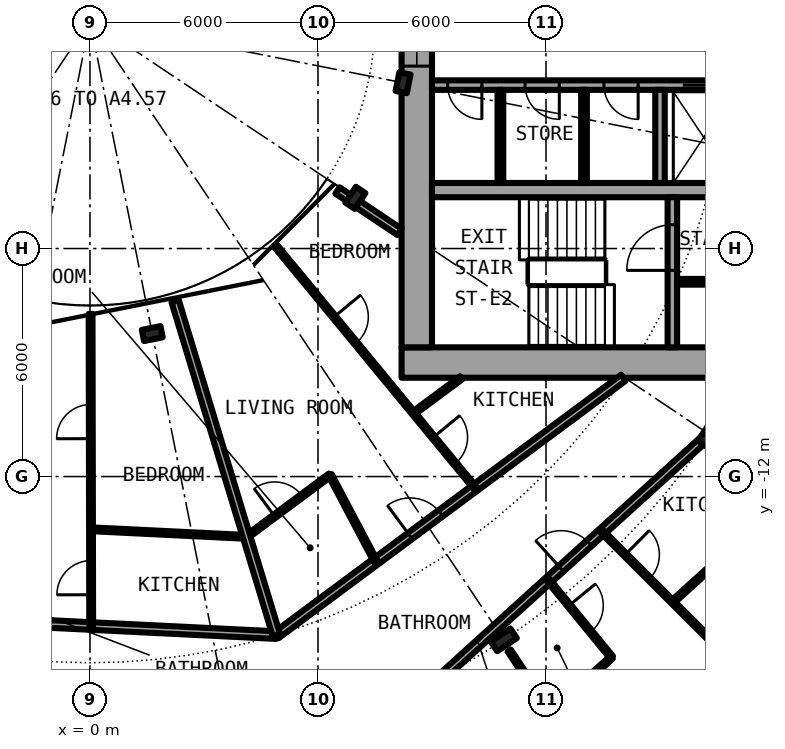
"""IFC4 building model, lengths in metres.
Left out: names, types, materials, properties, quantities, classifications, styles, units other than length and angle.
Written with IfcOpenShell. Run it as: python <this file> out.ifc"""

import sys

from ifc_helpers import new_model, si_unit, direction, frame, frame_2d, origin, origin_2d, place, context, subcontext, project, spatial, rectangle, i_section, extrude, element, fill, save


model = new_model("IFC4")
c1 = context("Model", 3, precision=1e-05, world=origin(), true_north=direction((0.0, 1.0)))
c2 = subcontext(c1, "Body", "Model", "MODEL_VIEW")
j1 = project(units=[si_unit("LENGTHUNIT", "METRE"), si_unit("PLANEANGLEUNIT", "RADIAN")], contexts=[c1])
p1 = place(None, origin())
s1 = spatial("IfcSite", under=j1, at=p1, CompositionType="ELEMENT")
p2 = place(p1, origin())
s2 = spatial("IfcBuilding", under=s1, at=p2, CompositionType="ELEMENT")
p3 = place(p2, frame((0.0, 0.0, 41.1)))
s3 = spatial("IfcBuildingStorey", under=s2, at=p3, CompositionType="ELEMENT", Elevation=41.1)
for number, where, z_axis, x_axis in (
    (1, (10.889, -16.297, 0.0), (0.0, 0.0, 1.0), (0.556, -0.831, 0.0)),
    (2, (16.297, -10.889, 0.0), (0.0, 0.0, 1.0), (0.831, -0.556, 0.0)),
):
    element("IfcColumn", number, at=place(p3, frame(where, z_axis=z_axis, x_axis=x_axis)), inside=s3, PredefinedType="COLUMN", context=c2, shape_type="SweptSolid", body=[
        extrude(i_section(OverallWidth=0.305, OverallDepth=0.62, WebThickness=0.021, FlangeThickness=0.04, FilletRadius=0.027, at=origin_2d()), origin(), (0.0, 0.0, 1.0), 3.05),
    ])
for number, where, z_axis, x_axis in (
    (3, (1.639, -8.239, 0.0), (0.0, 0.0, 1.0), (0.195, -0.981, 0.0)),
    (4, (6.984, -4.667, 0.0), (0.0, 0.0, 1.0), (0.831, -0.556, 0.0)),
    (5, (8.239, -1.639, 0.0), (0.0, 0.0, 1.0), (0.981, -0.195, 0.0)),
):
    element("IfcColumn", number, at=place(p3, frame(where, z_axis=z_axis, x_axis=x_axis)), inside=s3, PredefinedType="COLUMN", context=c2, shape_type="SweptSolid", body=[
        extrude(i_section(OverallWidth=0.3, OverallDepth=0.5, WebThickness=0.014, FlangeThickness=0.028, FilletRadius=0.027, at=origin_2d()), origin(), (0.0, 0.0, 1.0), 3.05),
    ])
p4 = place(p3, frame((8.2, -9.0, 0.0), z_axis=(0.0, 0.0, 1.0), x_axis=(1.0, 0.0, 0.0)))
e6 = element("IfcWall", 6, at=p4, inside=s3, PredefinedType="SHEAR", context=c2, shape_type="SweptSolid", body=[
    extrude(rectangle(XDim=14.2, YDim=0.8, at=frame_2d((7.1, 0.0))), origin(), (0.0, 0.0, 1.0), 3.05),
])
p5 = place(p4, frame((11.675, 0.0, 0.0)))
e7 = element("IfcOpeningElement", 7, at=p5, cuts=e6, PredefinedType="OPENING", context=c2, shape_type="SweptSolid", body=[
    extrude(rectangle(XDim=1.2, YDim=2.3, at=frame_2d((0.6, 1.15))), frame((0.0, 0.41, 0.0), z_axis=(0.0, -1.0, 0.0), x_axis=(1.0, 0.0, 0.0)), (0.0, 0.0, 1.0), 0.82),
])
p6 = place(p3, frame((8.6, -8.6, 0.0), z_axis=(0.0, 0.0, 1.0), x_axis=(0.0, 1.0, 0.0)))
e8 = element("IfcWall", 8, at=p6, inside=s3, PredefinedType="SHEAR", context=c2, shape_type="SweptSolid", body=[
    extrude(rectangle(XDim=17.2, YDim=0.8, at=frame_2d((8.6, 0.0))), origin(), (0.0, 0.0, 1.0), 3.05),
])
p7 = place(p6, frame((7.4, 0.0, 0.1)))
e9 = element("IfcOpeningElement", 9, at=p7, cuts=e8, PredefinedType="OPENING", context=c2, shape_type="SweptSolid", body=[
    extrude(rectangle(XDim=2.4, YDim=2.2, at=frame_2d((1.2, 1.1))), frame((0.0, 0.41, 0.0), z_axis=(0.0, -1.0, 0.0), x_axis=(1.0, 0.0, 0.0)), (0.0, 0.0, 1.0), 0.82),
])
p8 = place(p3, frame((19.15, -1.7, 0.0), z_axis=(0.0, 0.0, 1.0), x_axis=(-1.0, 0.0, 0.0)))
e10 = element("IfcWall", 10, at=p8, inside=s3, PredefinedType="SHEAR", context=c2, shape_type="SweptSolid", body=[
    extrude(rectangle(XDim=10.15, YDim=0.25, at=frame_2d((5.075, 0.0))), origin(), (0.0, 0.0, 1.0), 3.05),
])
p9 = place(p8, frame((2.45, 0.0, 0.0)))
e11 = element("IfcOpeningElement", 11, at=p9, cuts=e10, PredefinedType="OPENING", context=c2, shape_type="SweptSolid", body=[
    extrude(rectangle(XDim=1.1, YDim=2.3, at=frame_2d((0.55, 1.15))), frame((0.0, 0.135, 0.0), z_axis=(0.0, -1.0, 0.0), x_axis=(1.0, 0.0, 0.0)), (0.0, 0.0, 1.0), 0.27),
])
p10 = place(p8, frame((8.837, 0.0, 0.0)))
e12 = element("IfcOpeningElement", 12, at=p10, cuts=e10, PredefinedType="OPENING", context=c2, shape_type="SweptSolid", body=[
    extrude(rectangle(XDim=0.9, YDim=2.3, at=frame_2d((0.45, 1.15))), frame((0.0, 0.135, 0.0), z_axis=(0.0, -1.0, 0.0), x_axis=(1.0, 0.0, 0.0)), (0.0, 0.0, 1.0), 0.27),
])
p11 = place(p8, frame((6.8, 0.0, 0.0)))
e13 = element("IfcOpeningElement", 13, at=p11, cuts=e10, PredefinedType="OPENING", context=c2, shape_type="SweptSolid", body=[
    extrude(rectangle(XDim=0.9, YDim=2.3, at=frame_2d((0.45, 1.15))), frame((0.0, 0.135, 0.0), z_axis=(0.0, -1.0, 0.0), x_axis=(1.0, 0.0, 0.0)), (0.0, 0.0, 1.0), 0.27),
])
p12 = place(p8, frame((4.725, 0.0, 0.0)))
e14 = element("IfcOpeningElement", 14, at=p12, cuts=e10, PredefinedType="OPENING", context=c2, shape_type="SweptSolid", body=[
    extrude(rectangle(XDim=0.9, YDim=2.3, at=frame_2d((0.45, 1.15))), frame((0.0, 0.135, 0.0), z_axis=(0.0, -1.0, 0.0), x_axis=(1.0, 0.0, 0.0)), (0.0, 0.0, 1.0), 0.27),
])
p13 = place(p8, frame((0.413, 0.0, 0.0)))
e15 = element("IfcOpeningElement", 15, at=p13, cuts=e10, PredefinedType="OPENING", context=c2, shape_type="SweptSolid", body=[
    extrude(rectangle(XDim=0.9, YDim=2.3, at=frame_2d((0.45, 1.15))), frame((0.0, 0.135, 0.0), z_axis=(0.0, -1.0, 0.0), x_axis=(1.0, 0.0, 0.0)), (0.0, 0.0, 1.0), 0.27),
])
p14 = place(p3, frame((9.0, -4.462, 0.0), z_axis=(0.0, 0.0, 1.0), x_axis=(1.0, 0.0, 0.0)))
e16 = element("IfcWall", 16, at=p14, inside=s3, PredefinedType="SHEAR", context=c2, shape_type="SweptSolid", body=[
    extrude(rectangle(XDim=10.15, YDim=0.375, at=frame_2d((5.075, 0.0))), origin(), (0.0, 0.0, 1.0), 3.05),
])
p15 = place(p3, frame((15.325, -8.6, 0.0), z_axis=(0.0, 0.0, 1.0), x_axis=(0.0, 1.0, 0.0)))
e17 = element("IfcWall", 17, at=p15, inside=s3, PredefinedType="SHEAR", context=c2, shape_type="SweptSolid", body=[
    extrude(rectangle(XDim=3.95, YDim=0.25, at=frame_2d((1.975, 0.0))), origin(), (0.0, 0.0, 1.0), 3.05),
])
p16 = place(p15, frame((2.025, 0.0, 0.0)))
e18 = element("IfcOpeningElement", 18, at=p16, cuts=e17, PredefinedType="OPENING", context=c2, shape_type="SweptSolid", body=[
    extrude(rectangle(XDim=1.2, YDim=2.3, at=frame_2d((0.6, 1.15))), frame((0.0, 0.135, 0.0), z_axis=(0.0, -1.0, 0.0), x_axis=(1.0, 0.0, 0.0)), (0.0, 0.0, 1.0), 0.27),
])
p17 = place(p3, frame((15.0, -1.825, 0.0), z_axis=(0.0, 0.0, 1.0), x_axis=(0.0, -1.0, 0.0)))
e19 = element("IfcWall", 19, at=p17, inside=s3, PredefinedType="SOLIDWALL", context=c2, shape_type="SweptSolid", body=[
    extrude(rectangle(XDim=2.45, YDim=0.25, at=frame_2d((1.225, 0.0))), origin(), (0.0, 0.0, 1.0), 2.7),
])
for number, where, z_axis, x_axis in (
    (20, (10.8, -1.825, 0.0), (0.0, 0.0, 1.0), (0.0, -1.0, 0.0)),
    (21, (13.0, -1.825, 0.0), (0.0, 0.0, 1.0), (0.0, -1.0, 0.0)),
):
    element("IfcWall", number, at=place(p3, frame(where, z_axis=z_axis, x_axis=x_axis)), inside=s3, PredefinedType="PARTITIONING", context=c2, shape_type="SweptSolid", body=[
        extrude(rectangle(XDim=2.45, YDim=0.15, at=frame_2d((1.225, 0.0))), origin(), (0.0, 0.0, 1.0), 2.7),
    ])
p18 = place(p3, frame((15.45, -6.875, 0.0), z_axis=(0.0, 0.0, 1.0), x_axis=(1.0, 0.0, 0.0)))
e22 = element("IfcWall", 22, at=p18, inside=s3, PredefinedType="PARTITIONING", context=c2, shape_type="SweptSolid", body=[
    extrude(rectangle(XDim=3.7, YDim=0.15, at=frame_2d((1.85, 0.0))), origin(), (0.0, 0.0, 1.0), 2.7),
])
p19 = place(p18, frame((1.4, 0.0, 0.0)))
e23 = element("IfcOpeningElement", 23, at=p19, cuts=e22, PredefinedType="OPENING", context=c2, shape_type="SweptSolid", body=[
    extrude(rectangle(XDim=0.9, YDim=2.3, at=frame_2d((0.45, 1.15))), frame((0.0, 0.085, 0.0), z_axis=(0.0, -1.0, 0.0), x_axis=(1.0, 0.0, 0.0)), (0.0, 0.0, 1.0), 0.17),
])
p20 = place(p3, frame((10.506, -19.671, 0.0), z_axis=(0.0, 0.0, 1.0), x_axis=(0.741162670015, 0.671325477377, 0.0)))
e24 = element("IfcWall", 24, at=p20, inside=s3, PredefinedType="PARTITIONING", context=c2, shape_type="SweptSolid", body=[
    extrude(rectangle(XDim=4.342, YDim=0.1, at=frame_2d((2.171, 0.0))), origin(), (0.0, 0.0, 1.0), 2.7),
])
p21 = place(p20, frame((0.643, 0.0, 0.0)))
e25 = element("IfcOpeningElement", 25, at=p21, cuts=e24, PredefinedType="OPENING", context=c2, shape_type="SweptSolid", body=[
    extrude(rectangle(XDim=0.9, YDim=2.3, at=frame_2d((0.45, 1.15))), frame((0.0, 0.06, 0.0), z_axis=(0.0, -1.0, 0.0), x_axis=(1.0, 0.0, 0.0)), (0.0, 0.0, 1.0), 0.12),
])
p22 = place(p3, frame((15.33, -15.301, 0.0), z_axis=(0.0, 0.0, 1.0), x_axis=(0.741109646243, 0.671384012504, 0.0)))
e26 = element("IfcWall", 26, at=p22, inside=s3, PredefinedType="PARTITIONING", context=c2, shape_type="SweptSolid", body=[
    extrude(rectangle(XDim=4.331, YDim=0.1, at=frame_2d((2.166, 0.0))), origin(), (0.0, 0.0, 1.0), 2.7),
])
p23 = place(p3, frame((9.239, -17.287, 0.0), z_axis=(0.0, 0.0, 1.0), x_axis=(0.74089212117, 0.671624050186, 0.0)))
e27 = element("IfcWall", 27, at=p23, inside=s3, PredefinedType="PARTITIONING", context=c2, shape_type="SweptSolid", body=[
    extrude(rectangle(XDim=9.368, YDim=0.2, at=frame_2d((4.684, 0.0))), origin(), (0.0, 0.0, 1.0), 2.38),
])
p24 = place(p23, frame((4.263, 0.0, 0.0)))
e28 = element("IfcOpeningElement", 28, at=p24, cuts=e27, PredefinedType="OPENING", context=c2, shape_type="SweptSolid", body=[
    extrude(rectangle(XDim=1.0, YDim=2.3, at=frame_2d((0.5, 1.15))), frame((0.0, 0.11, 0.0), z_axis=(0.0, -1.0, 0.0), x_axis=(1.0, 0.0, 0.0)), (0.0, 0.0, 1.0), 0.22),
])
p25 = place(p3, frame((-6.469, -15.614, 0.0), z_axis=(0.0, 0.0, 1.0), x_axis=(0.998798520108, -0.049005267363, 0.0)))
e29 = element("IfcWall", 29, at=p25, inside=s3, PredefinedType="PARTITIONING", context=c2, shape_type="SweptSolid", body=[
    extrude(rectangle(XDim=11.389, YDim=0.2, at=frame_2d((5.694, 0.0))), origin(), (0.0, 0.0, 1.0), 2.7),
])
p26 = place(p25, frame((4.383, 0.0, 0.0)))
e30 = element("IfcOpeningElement", 30, at=p26, cuts=e29, PredefinedType="OPENING", context=c2, shape_type="SweptSolid", body=[
    extrude(rectangle(XDim=1.0, YDim=2.3, at=frame_2d((0.5, 1.15))), frame((0.0, 0.11, 0.0), z_axis=(0.0, -1.0, 0.0), x_axis=(1.0, 0.0, 0.0)), (0.0, 0.0, 1.0), 0.22),
])
p27 = place(p3, frame((4.906, -16.172, 0.0), z_axis=(0.0, 0.0, 1.0), x_axis=(0.803202106898, 0.595706618626, 0.0)))
e31 = element("IfcWall", 31, at=p27, inside=s3, PredefinedType="PARTITIONING", context=c2, shape_type="SweptSolid", body=[
    extrude(rectangle(XDim=11.368, YDim=0.2, at=frame_2d((5.684, 0.0))), origin(), (0.0, 0.0, 1.0), 2.7),
])
p28 = place(p27, frame((4.38, 0.0, 0.0)))
e32 = element("IfcOpeningElement", 32, at=p28, cuts=e31, PredefinedType="OPENING", context=c2, shape_type="SweptSolid", body=[
    extrude(rectangle(XDim=1.0, YDim=2.3, at=frame_2d((0.5, 1.15))), frame((0.0, 0.11, 0.0), z_axis=(0.0, -1.0, 0.0), x_axis=(1.0, 0.0, 0.0)), (0.0, 0.0, 1.0), 0.22),
])
p29 = place(p3, frame((0.03, -13.387, 0.0), z_axis=(0.0, 0.0, 1.0), x_axis=(0.998798386358, -0.049007993321, 0.0)))
e33 = element("IfcWall", 33, at=p29, inside=s3, PredefinedType="PARTITIONING", context=c2, shape_type="SweptSolid", body=[
    extrude(rectangle(XDim=4.1, YDim=0.1, at=frame_2d((2.05, 0.0))), origin(), (0.0, 0.0, 1.0), 2.7),
])
p30 = place(p3, frame((4.119, -13.59, 0.0), z_axis=(0.0, 0.0, 1.0), x_axis=(0.803128348509, 0.595806055542, 0.0)))
e34 = element("IfcWall", 34, at=p30, inside=s3, PredefinedType="PARTITIONING", context=c2, shape_type="SweptSolid", body=[
    extrude(rectangle(XDim=2.734, YDim=0.1, at=frame_2d((1.367, 0.0))), origin(), (0.0, 0.0, 1.0), 2.7),
])
p31 = place(p30, frame((0.92, 0.0, 0.0)))
e35 = element("IfcOpeningElement", 35, at=p31, cuts=e34, PredefinedType="OPENING", context=c2, shape_type="SweptSolid", body=[
    extrude(rectangle(XDim=0.9, YDim=2.3, at=frame_2d((0.45, 1.15))), frame((0.0, 0.06, 0.0), z_axis=(0.0, -1.0, 0.0), x_axis=(1.0, 0.0, 0.0)), (0.0, 0.0, 1.0), 0.12),
])
p32 = place(p3, frame((8.513, -10.332, 0.0), z_axis=(0.0, 0.0, 1.0), x_axis=(0.803264156882, 0.595622946392, 0.0)))
e36 = element("IfcWall", 36, at=p32, inside=s3, PredefinedType="PARTITIONING", context=c2, shape_type="SweptSolid", body=[
    extrude(rectangle(XDim=1.565, YDim=0.1, at=frame_2d((0.782, 0.0))), origin(), (0.0, 0.0, 1.0), 2.7),
])
p33 = place(p3, frame((6.513, -4.472, 0.0), z_axis=(0.0, 0.0, 1.0), x_axis=(0.831417956244, -0.555647533996, 0.0)))
e37 = element("IfcWall", 37, at=p33, inside=s3, PredefinedType="PARTITIONING", context=c2, shape_type="SweptSolid", body=[
    extrude(rectangle(XDim=1.962, YDim=0.2, at=frame_2d((0.981, 0.0))), origin(), (0.0, 0.0, 1.0), 2.7),
])
p34 = place(p3, frame((0.032, -15.933, 0.0), z_axis=(0.0, 0.0, 1.0), x_axis=(-0.0019321625, 0.999998133372, 0.0)))
e38 = element("IfcWall", 38, at=p34, inside=s3, PredefinedType="PARTITIONING", context=c2, shape_type="SweptSolid", body=[
    extrude(rectangle(XDim=8.213, YDim=0.1, at=frame_2d((4.106, 0.0))), origin(), (0.0, 0.0, 1.0), 2.7),
])
p35 = place(p34, frame((0.823, 0.0, 0.0)))
e39 = element("IfcOpeningElement", 39, at=p35, cuts=e38, PredefinedType="OPENING", context=c2, shape_type="SweptSolid", body=[
    extrude(rectangle(XDim=0.9, YDim=2.3, at=frame_2d((0.45, 1.15))), frame((0.0, 0.06, 0.0), z_axis=(0.0, -1.0, 0.0), x_axis=(1.0, 0.0, 0.0)), (0.0, 0.0, 1.0), 0.12),
])
p36 = place(p34, frame((4.93, 0.0, 0.0)))
e40 = element("IfcOpeningElement", 40, at=p36, cuts=e38, PredefinedType="OPENING", context=c2, shape_type="SweptSolid", body=[
    extrude(rectangle(XDim=0.9, YDim=2.3, at=frame_2d((0.45, 1.15))), frame((0.0, 0.06, 0.0), z_axis=(0.0, -1.0, 0.0), x_axis=(1.0, 0.0, 0.0)), (0.0, 0.0, 1.0), 0.12),
])
p37 = place(p3, frame((2.242, -7.388, 0.0), z_axis=(0.0, 0.0, 1.0), x_axis=(0.290225889812, -0.956958166736, 0.0)))
e41 = element("IfcWall", 41, at=p37, inside=s3, PredefinedType="PARTITIONING", context=c2, shape_type="SweptSolid", body=[
    extrude(rectangle(XDim=9.179, YDim=0.2, at=frame_2d((4.59, 0.0))), origin(), (0.0, 0.0, 1.0), 2.7),
])
p38 = place(p3, frame((4.908, -5.959, 0.0), z_axis=(0.0, 0.0, 1.0), x_axis=(0.636105207978, -0.771602335652, 0.0)))
e42 = element("IfcWall", 42, at=p38, inside=s3, PredefinedType="PARTITIONING", context=c2, shape_type="SweptSolid", body=[
    extrude(rectangle(XDim=8.213, YDim=0.1, at=frame_2d((4.106, 0.0))), origin(), (0.0, 0.0, 1.0), 2.7),
])
p39 = place(p38, frame((6.49, 0.0, 0.0)))
e43 = element("IfcOpeningElement", 43, at=p39, cuts=e42, PredefinedType="OPENING", context=c2, shape_type="SweptSolid", body=[
    extrude(rectangle(XDim=0.9, YDim=2.3, at=frame_2d((0.45, 1.15))), frame((0.0, 0.06, 0.0), z_axis=(0.0, -1.0, 0.0), x_axis=(1.0, 0.0, 0.0)), (0.0, 0.0, 1.0), 0.12),
])
p40 = place(p38, frame((2.384, 0.0, 0.0)))
e44 = element("IfcOpeningElement", 44, at=p40, cuts=e42, PredefinedType="OPENING", context=c2, shape_type="SweptSolid", body=[
    extrude(rectangle(XDim=0.9, YDim=2.3, at=frame_2d((0.45, 1.15))), frame((0.0, 0.06, 0.0), z_axis=(0.0, -1.0, 0.0), x_axis=(1.0, 0.0, 0.0)), (0.0, 0.0, 1.0), 0.12),
])
p41 = place(p3, frame((6.318, -11.96, 0.0), z_axis=(0.0, 0.0, 1.0), x_axis=(0.467001992543, -0.884256263173, 0.0)))
e45 = element("IfcWall", 45, at=p41, inside=s3, PredefinedType="PARTITIONING", context=c2, shape_type="SweptSolid", body=[
    extrude(rectangle(XDim=2.572, YDim=0.1, at=frame_2d((1.286, 0.0))), origin(), (0.0, 0.0, 1.0), 2.7),
])
p42 = place(p3, frame((11.03, -16.576, 0.0), z_axis=(0.0, 0.0, 1.0), x_axis=(0.553954074672, -0.83254722578, 0.0)))
e46 = element("IfcWall", 46, at=p42, inside=s3, PredefinedType="PARTITIONING", context=c2, shape_type="SweptSolid", body=[
    extrude(rectangle(XDim=1.964, YDim=0.1, at=frame_2d((0.982, 0.0))), origin(), (0.0, 0.0, 1.0), 2.7),
])
p43 = place(p3, frame((12.062, -14.727, 0.0), z_axis=(0.0, 0.0, 1.0), x_axis=(0.633688798249, -0.773588073185, 0.0)))
e47 = element("IfcWall", 47, at=p43, inside=s3, PredefinedType="PARTITIONING", context=c2, shape_type="SweptSolid", body=[
    extrude(rectangle(XDim=2.623, YDim=0.1, at=frame_2d((1.312, 0.0))), origin(), (0.0, 0.0, 1.0), 2.7),
])
p44 = place(p43, frame((0.861, 0.0, 0.0)))
e48 = element("IfcOpeningElement", 48, at=p44, cuts=e47, PredefinedType="OPENING", context=c2, shape_type="SweptSolid", body=[
    extrude(rectangle(XDim=0.9, YDim=2.3, at=frame_2d((0.45, 1.15))), frame((0.0, 0.06, 0.0), z_axis=(0.0, -1.0, 0.0), x_axis=(1.0, 0.0, 0.0)), (0.0, 0.0, 1.0), 0.12),
])
p45 = place(p3, frame((13.474, -13.448, 0.0), z_axis=(0.0, 0.0, 1.0), x_axis=(0.707901324545, -0.706311344031, 0.0)))
e49 = element("IfcWall", 49, at=p45, inside=s3, PredefinedType="PARTITIONING", context=c2, shape_type="SweptSolid", body=[
    extrude(rectangle(XDim=8.138, YDim=0.1, at=frame_2d((4.069, 0.0))), origin(), (0.0, 0.0, 1.0), 2.7),
])
p46 = place(p45, frame((0.861, 0.0, 0.0)))
e50 = element("IfcOpeningElement", 50, at=p46, cuts=e49, PredefinedType="OPENING", context=c2, shape_type="SweptSolid", body=[
    extrude(rectangle(XDim=0.9, YDim=2.3, at=frame_2d((0.45, 1.15))), frame((0.0, 0.06, 0.0), z_axis=(0.0, -1.0, 0.0), x_axis=(1.0, 0.0, 0.0)), (0.0, 0.0, 1.0), 0.12),
])
p47 = place(p45, frame((4.931, 0.0, 0.0)))
e51 = element("IfcOpeningElement", 51, at=p47, cuts=e49, PredefinedType="OPENING", context=c2, shape_type="SweptSolid", body=[
    extrude(rectangle(XDim=0.9, YDim=2.3, at=frame_2d((0.45, 1.15))), frame((0.0, 0.06, 0.0), z_axis=(0.0, -1.0, 0.0), x_axis=(1.0, 0.0, 0.0)), (0.0, 0.0, 1.0), 0.12),
])
p48 = place(p9, origin())
e52 = element("IfcDoor", 52, at=p48, inside=s3, OperationType="DOUBLE_DOOR_SLIDING", PredefinedType="DOOR", context=c2, shape_type="SweptSolid", body=[
    extrude(rectangle(XDim=1.1, YDim=2.3, at=frame_2d((0.55, 1.15))), frame((0.0, 0.025, 0.0), z_axis=(0.0, -1.0, 0.0), x_axis=(1.0, 0.0, 0.0)), (0.0, 0.0, 1.0), 0.05),
])
fill(e11, e52)
p49 = place(p10, origin())
e53 = element("IfcDoor", 53, at=p49, inside=s3, OperationType="SINGLE_SWING_LEFT", PredefinedType="DOOR", context=c2, shape_type="SweptSolid", body=[
    extrude(rectangle(XDim=0.9, YDim=2.3, at=frame_2d((0.45, 1.15))), frame((0.0, 0.025, 0.0), z_axis=(0.0, -1.0, 0.0), x_axis=(1.0, 0.0, 0.0)), (0.0, 0.0, 1.0), 0.05),
])
fill(e12, e53)
p50 = place(p11, origin())
e54 = element("IfcDoor", 54, at=p50, inside=s3, OperationType="SINGLE_SWING_LEFT", PredefinedType="DOOR", context=c2, shape_type="SweptSolid", body=[
    extrude(rectangle(XDim=0.9, YDim=2.3, at=frame_2d((0.45, 1.15))), frame((0.0, 0.025, 0.0), z_axis=(0.0, -1.0, 0.0), x_axis=(1.0, 0.0, 0.0)), (0.0, 0.0, 1.0), 0.05),
])
fill(e13, e54)
p51 = place(p12, origin())
e55 = element("IfcDoor", 55, at=p51, inside=s3, OperationType="SINGLE_SWING_LEFT", PredefinedType="DOOR", context=c2, shape_type="SweptSolid", body=[
    extrude(rectangle(XDim=0.9, YDim=2.3, at=frame_2d((0.45, 1.15))), frame((0.0, 0.025, 0.0), z_axis=(0.0, -1.0, 0.0), x_axis=(1.0, 0.0, 0.0)), (0.0, 0.0, 1.0), 0.05),
])
fill(e14, e55)
p52 = place(p16, origin())
e56 = element("IfcDoor", 56, at=p52, inside=s3, OperationType="SINGLE_SWING_LEFT", PredefinedType="DOOR", context=c2, shape_type="SweptSolid", body=[
    extrude(rectangle(XDim=1.2, YDim=2.3, at=frame_2d((0.6, 1.15))), frame((0.0, 0.025, 0.0), z_axis=(0.0, -1.0, 0.0), x_axis=(1.0, 0.0, 0.0)), (0.0, 0.0, 1.0), 0.05),
])
fill(e18, e56)
p53 = place(p7, origin())
e57 = element("IfcWindow", 57, at=p53, inside=s3, PartitioningType="SINGLE_PANEL", PredefinedType="WINDOW", context=c2, shape_type="SweptSolid", body=[
    extrude(rectangle(XDim=2.4, YDim=2.2, at=frame_2d((1.2, 1.1))), frame((0.0, 0.03, 0.0), z_axis=(0.0, -1.0, 0.0), x_axis=(1.0, 0.0, 0.0)), (0.0, 0.0, 1.0), 0.06),
])
fill(e9, e57)
p54 = place(p24, origin())
e58 = element("IfcDoor", 58, at=p54, inside=s3, OperationType="SINGLE_SWING_RIGHT", PredefinedType="DOOR", context=c2, shape_type="SweptSolid", body=[
    extrude(rectangle(XDim=1.0, YDim=2.3, at=frame_2d((0.5, 1.15))), frame((0.0, 0.025, 0.0), z_axis=(0.0, -1.0, 0.0), x_axis=(1.0, 0.0, 0.0)), (0.0, 0.0, 1.0), 0.05),
])
fill(e28, e58)
p55 = place(p44, origin())
e59 = element("IfcDoor", 59, at=p55, inside=s3, OperationType="SINGLE_SWING_LEFT", PredefinedType="DOOR", context=c2, shape_type="SweptSolid", body=[
    extrude(rectangle(XDim=0.9, YDim=2.3, at=frame_2d((0.45, 1.15))), frame((0.0, 0.025, 0.0), z_axis=(0.0, -1.0, 0.0), x_axis=(1.0, 0.0, 0.0)), (0.0, 0.0, 1.0), 0.05),
])
fill(e48, e59)
p56 = place(p46, origin())
e60 = element("IfcDoor", 60, at=p56, inside=s3, OperationType="SINGLE_SWING_LEFT", PredefinedType="DOOR", context=c2, shape_type="SweptSolid", body=[
    extrude(rectangle(XDim=0.9, YDim=2.3, at=frame_2d((0.45, 1.15))), frame((0.0, 0.025, 0.0), z_axis=(0.0, -1.0, 0.0), x_axis=(1.0, 0.0, 0.0)), (0.0, 0.0, 1.0), 0.05),
])
fill(e50, e60)
p57 = place(p35, origin())
e61 = element("IfcDoor", 61, at=p57, inside=s3, OperationType="SINGLE_SWING_LEFT", PredefinedType="DOOR", context=c2, shape_type="SweptSolid", body=[
    extrude(rectangle(XDim=0.9, YDim=2.3, at=frame_2d((0.45, 1.15))), frame((0.0, 0.025, 0.0), z_axis=(0.0, -1.0, 0.0), x_axis=(1.0, 0.0, 0.0)), (0.0, 0.0, 1.0), 0.05),
])
fill(e39, e61)
p58 = place(p36, origin())
e62 = element("IfcDoor", 62, at=p58, inside=s3, OperationType="SINGLE_SWING_RIGHT", PredefinedType="DOOR", context=c2, shape_type="SweptSolid", body=[
    extrude(rectangle(XDim=0.9, YDim=2.3, at=frame_2d((0.45, 1.15))), frame((0.0, 0.025, 0.0), z_axis=(0.0, -1.0, 0.0), x_axis=(1.0, 0.0, 0.0)), (0.0, 0.0, 1.0), 0.05),
])
fill(e40, e62)
p59 = place(p28, origin())
e63 = element("IfcDoor", 63, at=p59, inside=s3, OperationType="SINGLE_SWING_LEFT", PredefinedType="DOOR", context=c2, shape_type="SweptSolid", body=[
    extrude(rectangle(XDim=1.0, YDim=2.3, at=frame_2d((0.5, 1.15))), frame((0.0, 0.025, 0.0), z_axis=(0.0, -1.0, 0.0), x_axis=(1.0, 0.0, 0.0)), (0.0, 0.0, 1.0), 0.05),
])
fill(e32, e63)
p60 = place(p31, origin())
e64 = element("IfcDoor", 64, at=p60, inside=s3, OperationType="SINGLE_SWING_RIGHT", PredefinedType="DOOR", context=c2, shape_type="SweptSolid", body=[
    extrude(rectangle(XDim=0.9, YDim=2.3, at=frame_2d((0.45, 1.15))), frame((0.0, 0.025, 0.0), z_axis=(0.0, -1.0, 0.0), x_axis=(1.0, 0.0, 0.0)), (0.0, 0.0, 1.0), 0.05),
])
fill(e35, e64)
p61 = place(p39, origin())
e65 = element("IfcDoor", 65, at=p61, inside=s3, OperationType="SINGLE_SWING_RIGHT", PredefinedType="DOOR", context=c2, shape_type="SweptSolid", body=[
    extrude(rectangle(XDim=0.9, YDim=2.3, at=frame_2d((0.45, 1.15))), frame((0.0, 0.025, 0.0), z_axis=(0.0, -1.0, 0.0), x_axis=(1.0, 0.0, 0.0)), (0.0, 0.0, 1.0), 0.05),
])
fill(e43, e65)
p62 = place(p40, origin())
e66 = element("IfcDoor", 66, at=p62, inside=s3, OperationType="SINGLE_SWING_LEFT", PredefinedType="DOOR", context=c2, shape_type="SweptSolid", body=[
    extrude(rectangle(XDim=0.9, YDim=2.3, at=frame_2d((0.45, 1.15))), frame((0.0, 0.025, 0.0), z_axis=(0.0, -1.0, 0.0), x_axis=(1.0, 0.0, 0.0)), (0.0, 0.0, 1.0), 0.05),
])
fill(e44, e66)
save(model, sys.argv[1])
